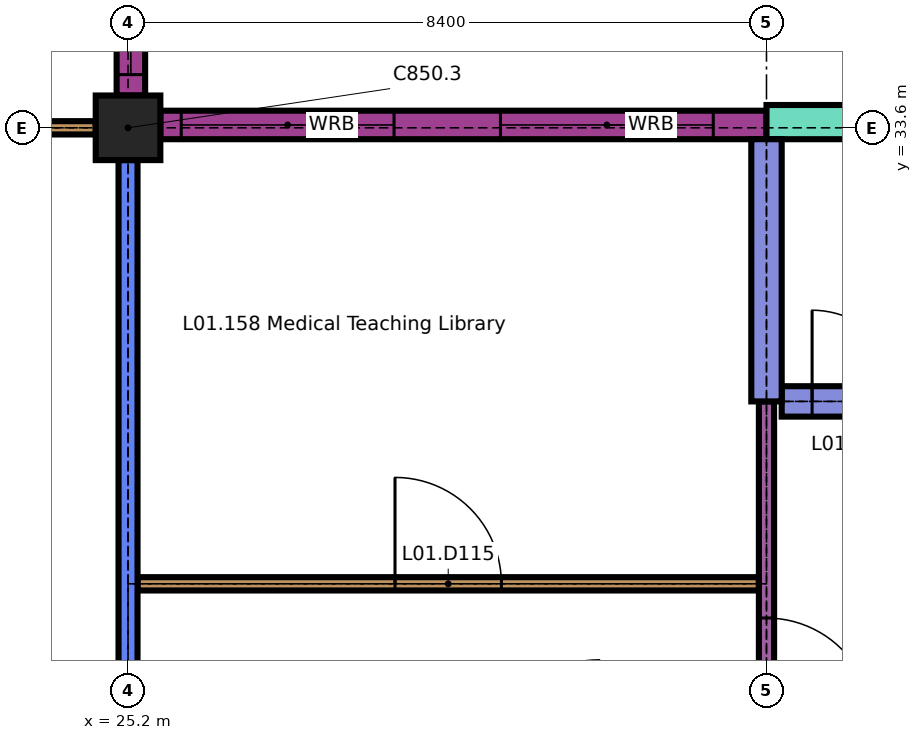
"""IFC4 building model, lengths in metres.
Left out: names, types, materials, properties, quantities, classifications, styles, units other than length and angle.
Written with IfcOpenShell. Run it as: python <this file> out.ifc"""

import sys

from ifc_helpers import new_model, si_unit, direction, frame, frame_2d, origin, origin_2d, place, context, subcontext, project, spatial, rectangle, extrude, element, fill, save


model = new_model("IFC4")
c1 = context("Model", 3, precision=1e-05, world=origin(), true_north=direction((0.0, 1.0)))
c2 = subcontext(c1, "Body", "Model", "MODEL_VIEW")
j1 = project(units=[si_unit("LENGTHUNIT", "METRE"), si_unit("PLANEANGLEUNIT", "RADIAN")], contexts=[c1])
p1 = place(None, origin())
s1 = spatial("IfcSite", under=j1, at=p1, CompositionType="ELEMENT")
p2 = place(p1, origin())
s2 = spatial("IfcBuilding", under=s1, at=p2, CompositionType="ELEMENT")
p3 = place(p2, frame((0.0, 0.0, 4.5)))
s3 = spatial("IfcBuildingStorey", under=s2, at=p3, CompositionType="ELEMENT", Elevation=4.5)
p4 = place(p3, frame((25.2, 33.6, 0.0), z_axis=(0.0, 0.0, 1.0), x_axis=(1.0, 0.0, 0.0)))
e1 = element("IfcColumn", 1, at=p4, inside=s3, PredefinedType="COLUMN", context=c2, shape_type="SweptSolid", body=[
    extrude(rectangle(XDim=0.85, YDim=0.85, at=origin_2d()), origin(), (0.0, 0.0, 1.0), 3.45),
])
p5 = place(p3, frame((25.625, 33.637, 0.0), z_axis=(0.0, 0.0, 1.0), x_axis=(1.0, 0.0, 0.0)))
e2 = element("IfcWall", 2, at=p5, inside=s3, PredefinedType="SOLIDWALL", context=c2, shape_type="SweptSolid", body=[
    extrude(rectangle(XDim=7.975, YDim=0.375, at=frame_2d((3.988, 0.0))), origin(), (0.0, 0.0, 1.0), 3.15),
])
p6 = place(p5, frame((0.275, 0.0, 1.0)))
e3 = element("IfcOpeningElement", 3, at=p6, cuts=e2, PredefinedType="OPENING", context=c2, shape_type="SweptSolid", body=[
    extrude(rectangle(XDim=2.8, YDim=1.2, at=frame_2d((1.4, 0.6))), frame((0.0, 0.198, 0.0), z_axis=(0.0, -1.0, 0.0), x_axis=(1.0, 0.0, 0.0)), (0.0, 0.0, 1.0), 0.395),
])
p7 = place(p5, frame((4.475, 0.0, 1.0)))
e4 = element("IfcOpeningElement", 4, at=p7, cuts=e2, PredefinedType="OPENING", context=c2, shape_type="SweptSolid", body=[
    extrude(rectangle(XDim=2.8, YDim=1.2, at=frame_2d((1.4, 0.6))), frame((0.0, 0.198, 0.0), z_axis=(0.0, -1.0, 0.0), x_axis=(1.0, 0.0, 0.0)), (0.0, 0.0, 1.0), 0.395),
])
p8 = place(p3, frame((33.6, 33.675, 0.0), z_axis=(0.0, 0.0, 1.0), x_axis=(1.0, 0.0, 0.0)))
e5 = element("IfcWall", 5, at=p8, inside=s3, PredefinedType="SOLIDWALL", context=c2, shape_type="SweptSolid", body=[
    extrude(rectangle(XDim=3.15, YDim=0.45, at=frame_2d((1.575, 0.0))), origin(), (0.0, 0.0, 1.0), 3.45),
])
p9 = place(p3, frame((25.238, 34.025, 0.0), z_axis=(0.0, 0.0, 1.0), x_axis=(0.0, 1.0, 0.0)))
e6 = element("IfcWall", 6, at=p9, inside=s3, PredefinedType="SOLIDWALL", context=c2, shape_type="SweptSolid", body=[
    extrude(rectangle(XDim=3.775, YDim=0.375, at=frame_2d((1.888, 0.0))), origin(), (0.0, 0.0, 1.0), 3.15),
])
p10 = place(p9, frame((0.275, 0.0, 1.0)))
e7 = element("IfcOpeningElement", 7, at=p10, cuts=e6, PredefinedType="OPENING", context=c2, shape_type="SweptSolid", body=[
    extrude(rectangle(XDim=2.8, YDim=1.2, at=frame_2d((1.4, 0.6))), frame((0.0, 0.198, 0.0), z_axis=(0.0, -1.0, 0.0), x_axis=(1.0, 0.0, 0.0)), (0.0, 0.0, 1.0), 0.395),
])
p11 = place(p3, frame((25.325, 27.6, 0.0), z_axis=(0.0, 0.0, 1.0), x_axis=(1.0, 0.0, 0.0)))
e8 = element("IfcWall", 8, at=p11, inside=s3, PredefinedType="PARTITIONING", context=c2, shape_type="SweptSolid", body=[
    extrude(rectangle(XDim=8.175, YDim=0.175, at=frame_2d((4.087, 0.0))), origin(), (0.0, 0.0, 1.0), 3.45),
])
p12 = place(p11, frame((3.387, 0.0, 0.0)))
e9 = element("IfcOpeningElement", 9, at=p12, cuts=e8, PredefinedType="OPENING", context=c2, shape_type="SweptSolid", body=[
    extrude(rectangle(XDim=1.4, YDim=2.1, at=frame_2d((0.7, 1.05))), frame((0.0, 0.097, 0.0), z_axis=(0.0, -1.0, 0.0), x_axis=(1.0, 0.0, 0.0)), (0.0, 0.0, 1.0), 0.195),
])
p13 = place(p3, frame((33.8, 30.0, 0.0), z_axis=(0.0, 0.0, 1.0), x_axis=(1.0, 0.0, 0.0)))
e10 = element("IfcWall", 10, at=p13, inside=s3, PredefinedType="SHEAR", context=c2, shape_type="SweptSolid", body=[
    extrude(rectangle(XDim=8.0, YDim=0.4, at=frame_2d((4.0, 0.0))), origin(), (0.0, 0.0, 1.0), 3.45),
])
p14 = place(p13, frame((0.4, 0.0, 0.0)))
e11 = element("IfcOpeningElement", 11, at=p14, cuts=e10, PredefinedType="OPENING", context=c2, shape_type="SweptSolid", body=[
    extrude(rectangle(XDim=1.2, YDim=2.1, at=frame_2d((0.6, 1.05))), frame((0.0, 0.21, 0.0), z_axis=(0.0, -1.0, 0.0), x_axis=(1.0, 0.0, 0.0)), (0.0, 0.0, 1.0), 0.42),
])
p15 = place(p3, frame((19.2, 33.6, 0.0), z_axis=(0.0, 0.0, 1.0), x_axis=(1.0, 0.0, 0.0)))
e12 = element("IfcWall", 12, at=p15, inside=s3, PredefinedType="PARTITIONING", context=c2, shape_type="SweptSolid", body=[
    extrude(rectangle(XDim=5.575, YDim=0.175, at=frame_2d((2.788, 0.0))), origin(), (0.0, 0.0, 1.0), 3.45),
])
p16 = place(p3, frame((25.2, 25.2, 0.0), z_axis=(0.0, 0.0, 1.0), x_axis=(0.0, 1.0, 0.0)))
e13 = element("IfcWall", 13, at=p16, inside=s3, PredefinedType="SOLIDWALL", context=c2, shape_type="SweptSolid", body=[
    extrude(rectangle(XDim=7.975, YDim=0.25, at=frame_2d((3.988, 0.0))), origin(), (0.0, 0.0, 1.0), 3.45),
])
p17 = place(p3, frame((33.6, 25.3, 0.0), z_axis=(0.0, 0.0, 1.0), x_axis=(0.0, 1.0, 0.0)))
e14 = element("IfcWall", 14, at=p17, inside=s3, PredefinedType="PARTITIONING", context=c2, shape_type="SweptSolid", body=[
    extrude(rectangle(XDim=4.7, YDim=0.2, at=frame_2d((2.35, 0.0))), origin(), (0.0, 0.0, 1.0), 3.45),
])
p18 = place(p17, frame((0.45, 0.0, 0.0)))
e15 = element("IfcOpeningElement", 15, at=p18, cuts=e14, PredefinedType="OPENING", context=c2, shape_type="SweptSolid", body=[
    extrude(rectangle(XDim=1.4, YDim=2.1, at=frame_2d((0.7, 1.05))), frame((0.0, 0.11, 0.0), z_axis=(0.0, -1.0, 0.0), x_axis=(1.0, 0.0, 0.0)), (0.0, 0.0, 1.0), 0.22),
])
p19 = place(p3, frame((33.6, 30.0, 0.0), z_axis=(0.0, 0.0, 1.0), x_axis=(0.0, 1.0, 0.0)))
e16 = element("IfcWall", 16, at=p19, inside=s3, PredefinedType="SHEAR", context=c2, shape_type="SweptSolid", body=[
    extrude(rectangle(XDim=3.45, YDim=0.4, at=frame_2d((1.725, 0.0))), origin(), (0.0, 0.0, 1.0), 3.45),
])
p20 = place(p6, origin())
e17 = element("IfcWindow", 17, at=p20, inside=s3, PartitioningType="DOUBLE_PANEL_VERTICAL", PredefinedType="WINDOW", context=c2, shape_type="SweptSolid", body=[
    extrude(rectangle(XDim=2.8, YDim=1.2, at=frame_2d((1.4, 0.6))), frame((0.0, 0.03, 0.0), z_axis=(0.0, -1.0, 0.0), x_axis=(1.0, 0.0, 0.0)), (0.0, 0.0, 1.0), 0.06),
])
fill(e3, e17)
p21 = place(p7, origin())
e18 = element("IfcWindow", 18, at=p21, inside=s3, PartitioningType="DOUBLE_PANEL_VERTICAL", PredefinedType="WINDOW", context=c2, shape_type="SweptSolid", body=[
    extrude(rectangle(XDim=2.8, YDim=1.2, at=frame_2d((1.4, 0.6))), frame((0.0, 0.03, 0.0), z_axis=(0.0, -1.0, 0.0), x_axis=(1.0, 0.0, 0.0)), (0.0, 0.0, 1.0), 0.06),
])
fill(e4, e18)
p22 = place(p10, origin())
e19 = element("IfcWindow", 19, at=p22, inside=s3, PartitioningType="DOUBLE_PANEL_VERTICAL", PredefinedType="WINDOW", context=c2, shape_type="SweptSolid", body=[
    extrude(rectangle(XDim=2.8, YDim=1.2, at=frame_2d((1.4, 0.6))), frame((0.0, 0.03, 0.0), z_axis=(0.0, -1.0, 0.0), x_axis=(1.0, 0.0, 0.0)), (0.0, 0.0, 1.0), 0.06),
])
fill(e7, e19)
p23 = place(p12, origin())
e20 = element("IfcDoor", 20, at=p23, inside=s3, OperationType="SINGLE_SWING_RIGHT", PredefinedType="DOOR", context=c2, shape_type="SweptSolid", body=[
    extrude(rectangle(XDim=1.4, YDim=2.1, at=frame_2d((0.7, 1.05))), frame((0.0, 0.025, 0.0), z_axis=(0.0, -1.0, 0.0), x_axis=(1.0, 0.0, 0.0)), (0.0, 0.0, 1.0), 0.05),
])
fill(e9, e20)
p24 = place(p14, origin())
e21 = element("IfcDoor", 21, at=p24, inside=s3, OperationType="SINGLE_SWING_RIGHT", PredefinedType="DOOR", context=c2, shape_type="SweptSolid", body=[
    extrude(rectangle(XDim=1.2, YDim=2.1, at=frame_2d((0.6, 1.05))), frame((0.0, 0.025, 0.0), z_axis=(0.0, -1.0, 0.0), x_axis=(1.0, 0.0, 0.0)), (0.0, 0.0, 1.0), 0.05),
])
fill(e11, e21)
p25 = place(p18, origin())
e22 = element("IfcDoor", 22, at=p25, inside=s3, OperationType="SINGLE_SWING_LEFT", PredefinedType="DOOR", context=c2, shape_type="SweptSolid", body=[
    extrude(rectangle(XDim=1.4, YDim=2.1, at=frame_2d((0.7, 1.05))), frame((0.0, 0.03, 0.0), z_axis=(0.0, -1.0, 0.0), x_axis=(1.0, 0.0, 0.0)), (0.0, 0.0, 1.0), 0.06),
])
fill(e15, e22)
save(model, sys.argv[1])
